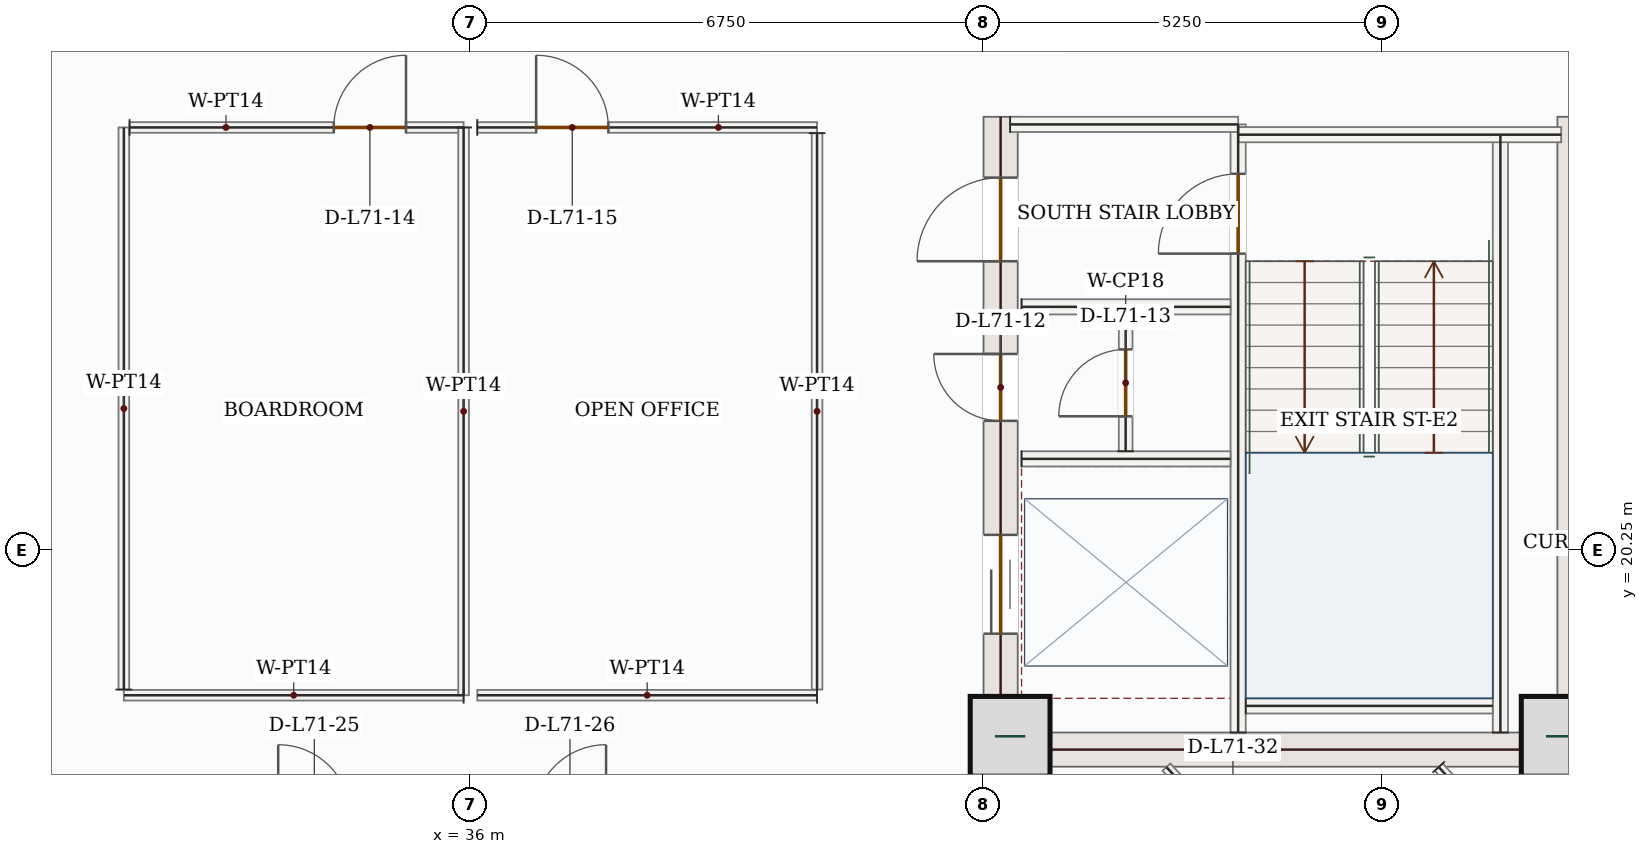
"""IFC4 building model, lengths in metres.
Left out: names, types, materials, properties, quantities, classifications, styles, units other than length and angle.
Written with IfcOpenShell. Run it as: python <this file> out.ifc"""

import sys

from ifc_helpers import new_model, si_unit, direction, frame, frame_2d, origin, origin_2d, place, context, subcontext, project, spatial, rectangle, extrude, source, transform, mapped, element, fill, save


model = new_model("IFC4")
c1 = context("Model", 3, precision=1e-05, world=origin(), true_north=direction((0.0, 1.0)))
c2 = subcontext(c1, "Body", "Model", "MODEL_VIEW")
j1 = project(units=[si_unit("LENGTHUNIT", "METRE"), si_unit("PLANEANGLEUNIT", "RADIAN")], contexts=[c1])
p1 = place(None, origin())
s1 = spatial("IfcSite", under=j1, at=p1, CompositionType="ELEMENT")
p2 = place(p1, origin())
s2 = spatial("IfcBuilding", under=s1, at=p2, CompositionType="ELEMENT")
p3 = place(p2, frame((0.0, 0.0, 295.35)))
s3 = spatial("IfcBuildingStorey", under=s2, at=p3, CompositionType="ELEMENT", Elevation=295.35)
p4 = place(p3, frame((42.975, 17.4, 0.0), z_axis=(0.0, 0.0, 1.0), x_axis=(0.0, 1.0, 0.0)))
e1 = element("IfcWall", 1, at=p4, inside=s3, PredefinedType="SHEAR", context=c2, shape_type="SweptSolid", body=[
    extrude(rectangle(XDim=8.55, YDim=0.45, at=frame_2d((4.275, 0.0))), origin(), (0.0, 0.0, 1.0), 3.5),
])
p5 = place(p4, frame((6.65, 0.0, 0.0)))
e2 = element("IfcOpeningElement", 2, at=p5, cuts=e1, PredefinedType="OPENING", context=c2, shape_type="SweptSolid", body=[
    extrude(rectangle(XDim=1.1, YDim=2.2, at=frame_2d((0.55, 1.1))), frame((0.0, 0.235, 0.0), z_axis=(0.0, -1.0, 0.0), x_axis=(1.0, 0.0, 0.0)), (0.0, 0.0, 1.0), 0.47),
])
p6 = place(p4, frame((1.75, 0.0, 0.0)))
e3 = element("IfcOpeningElement", 3, at=p6, cuts=e1, PredefinedType="OPENING", context=c2, shape_type="SweptSolid", body=[
    extrude(rectangle(XDim=1.3, YDim=2.2, at=frame_2d((0.65, 1.1))), frame((0.0, 0.235, 0.0), z_axis=(0.0, -1.0, 0.0), x_axis=(1.0, 0.0, 0.0)), (0.0, 0.0, 1.0), 0.47),
])
p7 = place(p4, frame((4.55, 0.0, 0.0)))
e4 = element("IfcOpeningElement", 4, at=p7, cuts=e1, PredefinedType="OPENING", context=c2, shape_type="SweptSolid", body=[
    extrude(rectangle(XDim=0.88, YDim=2.1, at=frame_2d((0.44, 1.05))), frame((0.0, 0.235, 0.0), z_axis=(0.0, -1.0, 0.0), x_axis=(1.0, 0.0, 0.0)), (0.0, 0.0, 1.0), 0.47),
])
m1 = source(origin(), c2, "Body", "SweptSolid", [
    extrude(rectangle(XDim=8.55, YDim=0.45, at=frame_2d((4.275, 0.0))), origin(), (0.0, 0.0, 1.0), 3.5),
])
p8 = place(p3, frame((50.525, 17.4, 0.0), z_axis=(0.0, 0.0, 1.0), x_axis=(0.0, 1.0, 0.0)))
e5 = element("IfcWall", 5, at=p8, inside=s3, PredefinedType="SHEAR", context=c2, shape_type="MappedRepresentation", body=[
    mapped(m1, transform((0.0, 0.0, 0.0), x_axis=(1.0, 0.0, 0.0), y_axis=(0.0, 1.0, 0.0), z_axis=(0.0, 0.0, 1.0), scale=1.0)),
])
m2 = source(origin(), c2, "Body", "SweptSolid", [
    extrude(rectangle(XDim=7.1, YDim=0.45, at=frame_2d((3.55, 0.0))), origin(), (0.0, 0.0, 1.0), 3.5),
])
p9 = place(p3, frame((43.2, 17.625, 0.0), z_axis=(0.0, 0.0, 1.0), x_axis=(1.0, 0.0, 0.0)))
e6 = element("IfcWall", 6, at=p9, inside=s3, PredefinedType="SHEAR", context=c2, shape_type="MappedRepresentation", body=[
    mapped(m2, transform((0.0, 0.0, 0.0), x_axis=(1.0, 0.0, 0.0), y_axis=(0.0, 1.0, 0.0), z_axis=(0.0, 0.0, 1.0), scale=1.0)),
])
m3 = source(origin(), c2, "Body", "SweptSolid", [
    extrude(rectangle(XDim=1.05, YDim=1.05, at=origin_2d()), origin(), (0.0, 0.0, 1.0), 3.75),
])
for number, where, z_axis, x_axis in (
    (7, (43.1, 17.8, 0.0), (0.0, 0.0, 1.0), (1.0, 0.0, 0.0)),
    (8, (50.35, 17.8, 0.0), (0.0, 0.0, 1.0), (1.0, 0.0, 0.0)),
):
    element("IfcColumn", number, at=place(p3, frame(where, z_axis=z_axis, x_axis=x_axis)), inside=s3, PredefinedType="COLUMN", context=c2, shape_type="MappedRepresentation", body=[
        mapped(m3, transform((0.0, 0.0, 0.0), x_axis=(1.0, 0.0, 0.0), y_axis=(0.0, 1.0, 0.0), z_axis=(0.0, 0.0, 1.0), scale=1.0)),
    ])
m4 = source(origin(), c2, "Body", "SweptSolid", [
    extrude(rectangle(XDim=11.69, YDim=0.28, at=frame_2d((5.845, 0.0))), origin(), (0.0, 0.0, 1.0), 3.5),
])
p10 = place(p3, frame((53.06, 18.458, 0.0), z_axis=(0.0, 0.0, 1.0), x_axis=(-0.712557502542, -0.701613715353, 0.0)))
e9 = element("IfcWall", 9, at=p10, inside=s3, PredefinedType="SOLIDWALL", context=c2, shape_type="MappedRepresentation", body=[
    mapped(m4, transform((0.0, 0.0, 0.0), x_axis=(1.0, 0.0, 0.0), y_axis=(0.0, 1.0, 0.0), z_axis=(0.0, 0.0, 1.0), scale=1.0)),
])
m5 = source(origin(), c2, "Body", "SweptSolid", [
    extrude(rectangle(XDim=7.87, YDim=0.2, at=frame_2d((3.935, 0.0))), origin(), (0.0, 0.0, 1.0), 3.5),
])
p11 = place(p3, frame((49.55, 17.85, 0.0), z_axis=(0.0, 0.0, 1.0), x_axis=(0.0, 1.0, 0.0)))
e10 = element("IfcWall", 10, at=p11, inside=s3, PredefinedType="SOLIDWALL", context=c2, shape_type="MappedRepresentation", body=[
    mapped(m5, transform((0.0, 0.0, 0.0), x_axis=(1.0, 0.0, 0.0), y_axis=(0.0, 1.0, 0.0), z_axis=(0.0, 0.0, 1.0), scale=1.0)),
])
p12 = place(p3, frame((46.1, 17.85, 0.0), z_axis=(0.0, 0.0, 1.0), x_axis=(0.0, 1.0, 0.0)))
e11 = element("IfcWall", 11, at=p12, inside=s3, PredefinedType="SOLIDWALL", context=c2, shape_type="SweptSolid", body=[
    extrude(rectangle(XDim=8.0, YDim=0.2, at=frame_2d((4.0, 0.0))), origin(), (0.0, 0.0, 1.0), 3.5),
])
p13 = place(p12, frame((6.3, 0.0, 0.0)))
e12 = element("IfcOpeningElement", 12, at=p13, cuts=e11, PredefinedType="OPENING", context=c2, shape_type="SweptSolid", body=[
    extrude(rectangle(XDim=1.05, YDim=2.15, at=frame_2d((0.525, 1.075))), frame((0.0, 0.11, 0.0), z_axis=(0.0, -1.0, 0.0), x_axis=(1.0, 0.0, 0.0)), (0.0, 0.0, 1.0), 0.22),
])
m6 = source(origin(), c2, "Body", "SweptSolid", [
    extrude(rectangle(XDim=3.0, YDim=0.2, at=frame_2d((1.5, 0.0))), origin(), (0.0, 0.0, 1.0), 3.5),
])
p14 = place(p3, frame((43.1, 25.85, 0.0), z_axis=(0.0, 0.0, 1.0), x_axis=(1.0, 0.0, 0.0)))
e13 = element("IfcWall", 13, at=p14, inside=s3, PredefinedType="SOLIDWALL", context=c2, shape_type="MappedRepresentation", body=[
    mapped(m6, transform((0.0, 0.0, 0.0), x_axis=(1.0, 0.0, 0.0), y_axis=(0.0, 1.0, 0.0), z_axis=(0.0, 0.0, 1.0), scale=1.0)),
])
m7 = source(origin(), c2, "Body", "SweptSolid", [
    extrude(rectangle(XDim=4.25, YDim=0.2, at=frame_2d((2.125, 0.0))), origin(), (0.0, 0.0, 1.0), 3.5),
])
p15 = place(p3, frame((46.1, 25.715, 0.0), z_axis=(0.0, 0.0, 1.0), x_axis=(1.0, 0.0, 0.0)))
e14 = element("IfcWall", 14, at=p15, inside=s3, PredefinedType="SOLIDWALL", context=c2, shape_type="MappedRepresentation", body=[
    mapped(m7, transform((0.0, 0.0, 0.0), x_axis=(1.0, 0.0, 0.0), y_axis=(0.0, 1.0, 0.0), z_axis=(0.0, 0.0, 1.0), scale=1.0)),
])
m8 = source(origin(), c2, "Body", "SweptSolid", [
    extrude(rectangle(XDim=3.25, YDim=0.2, at=frame_2d((1.625, 0.0))), origin(), (0.0, 0.0, 1.0), 3.5),
])
p16 = place(p3, frame((46.2, 18.2, 0.0), z_axis=(0.0, 0.0, 1.0), x_axis=(1.0, 0.0, 0.0)))
e15 = element("IfcWall", 15, at=p16, inside=s3, PredefinedType="SOLIDWALL", context=c2, shape_type="MappedRepresentation", body=[
    mapped(m8, transform((0.0, 0.0, 0.0), x_axis=(1.0, 0.0, 0.0), y_axis=(0.0, 1.0, 0.0), z_axis=(0.0, 0.0, 1.0), scale=1.0)),
])
m9 = source(origin(), c2, "Body", "SweptSolid", [
    extrude(rectangle(XDim=2.75, YDim=0.2, at=frame_2d((1.375, 0.0))), origin(), (0.0, 0.0, 1.0), 3.5),
])
for number, where, z_axis, x_axis in (
    (16, (43.25, 23.45, 0.0), (0.0, 0.0, 1.0), (1.0, 0.0, 0.0)),
    (17, (43.25, 21.45, 0.0), (0.0, 0.0, 1.0), (1.0, 0.0, 0.0)),
):
    element("IfcWall", number, at=place(p3, frame(where, z_axis=z_axis, x_axis=x_axis)), inside=s3, PredefinedType="SOLIDWALL", context=c2, shape_type="MappedRepresentation", body=[
        mapped(m9, transform((0.0, 0.0, 0.0), x_axis=(1.0, 0.0, 0.0), y_axis=(0.0, 1.0, 0.0), z_axis=(0.0, 0.0, 1.0), scale=1.0)),
    ])
p17 = place(p3, frame((44.62, 21.55, 0.0), z_axis=(0.0, 0.0, 1.0), x_axis=(0.0, 1.0, 0.0)))
e18 = element("IfcWall", 18, at=p17, inside=s3, PredefinedType="PARTITIONING", context=c2, shape_type="SweptSolid", body=[
    extrude(rectangle(XDim=1.8, YDim=0.18, at=frame_2d((0.9, 0.0))), origin(), (0.0, 0.0, 1.0), 3.5),
])
p18 = place(p17, frame((0.46, 0.0, 0.0)))
e19 = element("IfcOpeningElement", 19, at=p18, cuts=e18, PredefinedType="OPENING", context=c2, shape_type="SweptSolid", body=[
    extrude(rectangle(XDim=0.88, YDim=2.1, at=frame_2d((0.44, 1.05))), frame((0.0, 0.1, 0.0), z_axis=(0.0, -1.0, 0.0), x_axis=(1.0, 0.0, 0.0)), (0.0, 0.0, 1.0), 0.2),
])
p19 = place(p3, frame((48.311, 13.985, 0.0), z_axis=(0.0, 0.0, 1.0), x_axis=(-0.679002327249, 0.73413611789, 0.0)))
e20 = element("IfcWall", 20, at=p19, inside=s3, PredefinedType="PARTITIONING", context=c2, shape_type="SweptSolid", body=[
    extrude(rectangle(XDim=4.645, YDim=0.14, at=frame_2d((2.323, 0.0))), origin(), (0.0, 0.0, 1.0), 3.5),
])
p20 = place(p19, frame((2.882, 0.0, 0.0)))
e21 = element("IfcOpeningElement", 21, at=p20, cuts=e20, PredefinedType="OPENING", context=c2, shape_type="SweptSolid", body=[
    extrude(rectangle(XDim=0.95, YDim=2.15, at=frame_2d((0.475, 1.075))), frame((0.0, 0.08, 0.0), z_axis=(0.0, -1.0, 0.0), x_axis=(1.0, 0.0, 0.0)), (0.0, 0.0, 1.0), 0.16),
])
m10 = source(origin(), c2, "Body", "SweptSolid", [
    extrude(rectangle(XDim=2.13, YDim=0.14, at=frame_2d((1.065, 0.0))), origin(), (0.0, 0.0, 1.0), 3.5),
])
p21 = place(p3, frame((48.739, 17.395, 0.0), z_axis=(0.0, 0.0, 1.0), x_axis=(0.678946242809, -0.734187986401, 0.0)))
e22 = element("IfcWall", 22, at=p21, inside=s3, PredefinedType="PARTITIONING", context=c2, shape_type="MappedRepresentation", body=[
    mapped(m10, transform((0.0, 0.0, 0.0), x_axis=(1.0, 0.0, 0.0), y_axis=(0.0, 1.0, 0.0), z_axis=(0.0, 0.0, 1.0), scale=1.0)),
])
m11 = source(origin(), c2, "Body", "SweptSolid", [
    extrude(rectangle(XDim=4.47, YDim=0.14, at=frame_2d((2.235, 0.0))), origin(), (0.0, 0.0, 1.0), 3.5),
])
p22 = place(p3, frame((35.91, 18.34, 0.0), z_axis=(0.0, 0.0, 1.0), x_axis=(-1.0, 0.0, 0.0)))
e23 = element("IfcWall", 23, at=p22, inside=s3, PredefinedType="PARTITIONING", context=c2, shape_type="MappedRepresentation", body=[
    mapped(m11, transform((0.0, 0.0, 0.0), x_axis=(1.0, 0.0, 0.0), y_axis=(0.0, 1.0, 0.0), z_axis=(0.0, 0.0, 1.0), scale=1.0)),
])
m12 = source(origin(), c2, "Body", "SweptSolid", [
    extrude(rectangle(XDim=7.395, YDim=0.14, at=frame_2d((3.698, 0.0))), origin(), (0.0, 0.0, 1.0), 3.5),
])
p23 = place(p3, frame((31.44, 18.415, 0.0), z_axis=(0.0, 0.0, 1.0), x_axis=(0.0, 1.0, 0.0)))
e24 = element("IfcWall", 24, at=p23, inside=s3, PredefinedType="PARTITIONING", context=c2, shape_type="MappedRepresentation", body=[
    mapped(m12, transform((0.0, 0.0, 0.0), x_axis=(1.0, 0.0, 0.0), y_axis=(0.0, 1.0, 0.0), z_axis=(0.0, 0.0, 1.0), scale=1.0)),
])
p24 = place(p3, frame((31.515, 25.81, 0.0), z_axis=(0.0, 0.0, 1.0), x_axis=(1.0, 0.0, 0.0)))
e25 = element("IfcWall", 25, at=p24, inside=s3, PredefinedType="PARTITIONING", context=c2, shape_type="SweptSolid", body=[
    extrude(rectangle(XDim=4.395, YDim=0.14, at=frame_2d((2.198, 0.0))), origin(), (0.0, 0.0, 1.0), 3.5),
])
p25 = place(p24, frame((2.687, 0.0, 0.0)))
e26 = element("IfcOpeningElement", 26, at=p25, cuts=e25, PredefinedType="OPENING", context=c2, shape_type="SweptSolid", body=[
    extrude(rectangle(XDim=0.95, YDim=2.15, at=frame_2d((0.475, 1.075))), frame((0.0, 0.08, 0.0), z_axis=(0.0, -1.0, 0.0), x_axis=(1.0, 0.0, 0.0)), (0.0, 0.0, 1.0), 0.16),
])
m13 = source(origin(), c2, "Body", "SweptSolid", [
    extrude(rectangle(XDim=7.47, YDim=0.14, at=frame_2d((3.735, 0.0))), origin(), (0.0, 0.0, 1.0), 3.5),
])
p26 = place(p3, frame((35.91, 25.81, 0.0), z_axis=(0.0, 0.0, 1.0), x_axis=(0.0, -1.0, 0.0)))
e27 = element("IfcWall", 27, at=p26, inside=s3, PredefinedType="PARTITIONING", context=c2, shape_type="MappedRepresentation", body=[
    mapped(m13, transform((0.0, 0.0, 0.0), x_axis=(1.0, 0.0, 0.0), y_axis=(0.0, 1.0, 0.0), z_axis=(0.0, 0.0, 1.0), scale=1.0)),
])
p27 = place(p3, frame((40.56, 18.34, 0.0), z_axis=(0.0, 0.0, 1.0), x_axis=(-1.0, 0.0, 0.0)))
e28 = element("IfcWall", 28, at=p27, inside=s3, PredefinedType="PARTITIONING", context=c2, shape_type="MappedRepresentation", body=[
    mapped(m11, transform((0.0, 0.0, 0.0), x_axis=(1.0, 0.0, 0.0), y_axis=(0.0, 1.0, 0.0), z_axis=(0.0, 0.0, 1.0), scale=1.0)),
])
p28 = place(p3, frame((36.09, 25.81, 0.0), z_axis=(0.0, 0.0, 1.0), x_axis=(1.0, 0.0, 0.0)))
e29 = element("IfcWall", 29, at=p28, inside=s3, PredefinedType="PARTITIONING", context=c2, shape_type="SweptSolid", body=[
    extrude(rectangle(XDim=4.47, YDim=0.14, at=frame_2d((2.235, 0.0))), origin(), (0.0, 0.0, 1.0), 3.5),
])
p29 = place(p28, frame((0.774, 0.0, 0.0)))
e30 = element("IfcOpeningElement", 30, at=p29, cuts=e29, PredefinedType="OPENING", context=c2, shape_type="SweptSolid", body=[
    extrude(rectangle(XDim=0.95, YDim=2.15, at=frame_2d((0.475, 1.075))), frame((0.0, 0.08, 0.0), z_axis=(0.0, -1.0, 0.0), x_axis=(1.0, 0.0, 0.0)), (0.0, 0.0, 1.0), 0.16),
])
m14 = source(origin(), c2, "Body", "SweptSolid", [
    extrude(rectangle(XDim=7.32, YDim=0.14, at=frame_2d((3.66, 0.0))), origin(), (0.0, 0.0, 1.0), 3.5),
])
p30 = place(p3, frame((40.56, 25.735, 0.0), z_axis=(0.0, 0.0, 1.0), x_axis=(0.0, -1.0, 0.0)))
e31 = element("IfcWall", 31, at=p30, inside=s3, PredefinedType="PARTITIONING", context=c2, shape_type="MappedRepresentation", body=[
    mapped(m14, transform((0.0, 0.0, 0.0), x_axis=(1.0, 0.0, 0.0), y_axis=(0.0, 1.0, 0.0), z_axis=(0.0, 0.0, 1.0), scale=1.0)),
])
m15 = source(origin(), c2, "Body", "SweptSolid", [
    extrude(rectangle(XDim=1.05, YDim=2.15, at=frame_2d((0.525, 1.075))), frame((0.0, 0.025, 0.0), z_axis=(0.0, -1.0, 0.0), x_axis=(1.0, 0.0, 0.0)), (0.0, 0.0, 1.0), 0.05),
])
p31 = place(p13, origin())
e32 = element("IfcDoor", 32, at=p31, inside=s3, OperationType="SINGLE_SWING_LEFT", PredefinedType="DOOR", context=c2, shape_type="MappedRepresentation", body=[
    mapped(m15, transform((0.0, 0.0, 0.0), x_axis=(1.0, 0.0, 0.0), y_axis=(0.0, 1.0, 0.0), z_axis=(0.0, 0.0, 1.0), scale=1.0)),
])
fill(e12, e32)
m16 = source(origin(), c2, "Body", "SweptSolid", [
    extrude(rectangle(XDim=1.1, YDim=2.2, at=frame_2d((0.55, 1.1))), frame((0.0, 0.025, 0.0), z_axis=(0.0, -1.0, 0.0), x_axis=(1.0, 0.0, 0.0)), (0.0, 0.0, 1.0), 0.05),
])
p32 = place(p5, origin())
e33 = element("IfcDoor", 33, at=p32, inside=s3, OperationType="SINGLE_SWING_LEFT", PredefinedType="DOOR", context=c2, shape_type="MappedRepresentation", body=[
    mapped(m16, transform((0.0, 0.0, 0.0), x_axis=(1.0, 0.0, 0.0), y_axis=(0.0, 1.0, 0.0), z_axis=(0.0, 0.0, 1.0), scale=1.0)),
])
fill(e2, e33)
m17 = source(origin(), c2, "Body", "SweptSolid", [
    extrude(rectangle(XDim=1.3, YDim=2.2, at=frame_2d((0.65, 1.1))), frame((0.0, 0.025, 0.0), z_axis=(0.0, -1.0, 0.0), x_axis=(1.0, 0.0, 0.0)), (0.0, 0.0, 1.0), 0.05),
])
p33 = place(p6, origin())
e34 = element("IfcDoor", 34, at=p33, inside=s3, OperationType="DOUBLE_DOOR_SLIDING", PredefinedType="DOOR", context=c2, shape_type="MappedRepresentation", body=[
    mapped(m17, transform((0.0, 0.0, 0.0), x_axis=(1.0, 0.0, 0.0), y_axis=(0.0, 1.0, 0.0), z_axis=(0.0, 0.0, 1.0), scale=1.0)),
])
fill(e3, e34)
m18 = source(origin(), c2, "Body", "SweptSolid", [
    extrude(rectangle(XDim=0.88, YDim=2.1, at=frame_2d((0.44, 1.05))), frame((0.0, 0.025, 0.0), z_axis=(0.0, -1.0, 0.0), x_axis=(1.0, 0.0, 0.0)), (0.0, 0.0, 1.0), 0.05),
])
p34 = place(p7, origin())
e35 = element("IfcDoor", 35, at=p34, inside=s3, OperationType="SINGLE_SWING_RIGHT", PredefinedType="DOOR", context=c2, shape_type="MappedRepresentation", body=[
    mapped(m18, transform((0.0, 0.0, 0.0), x_axis=(1.0, 0.0, 0.0), y_axis=(0.0, 1.0, 0.0), z_axis=(0.0, 0.0, 1.0), scale=1.0)),
])
fill(e4, e35)
p35 = place(p18, origin())
e36 = element("IfcDoor", 36, at=p35, inside=s3, OperationType="SINGLE_SWING_LEFT", PredefinedType="DOOR", context=c2, shape_type="MappedRepresentation", body=[
    mapped(m18, transform((0.0, 0.0, 0.0), x_axis=(1.0, 0.0, 0.0), y_axis=(0.0, 1.0, 0.0), z_axis=(0.0, 0.0, 1.0), scale=1.0)),
])
fill(e19, e36)
m19 = source(origin(), c2, "Body", "SweptSolid", [
    extrude(rectangle(XDim=0.95, YDim=2.15, at=frame_2d((0.475, 1.075))), frame((0.0, 0.025, 0.0), z_axis=(0.0, -1.0, 0.0), x_axis=(1.0, 0.0, 0.0)), (0.0, 0.0, 1.0), 0.05),
])
p36 = place(p25, origin())
e37 = element("IfcDoor", 37, at=p36, inside=s3, OperationType="SINGLE_SWING_RIGHT", PredefinedType="DOOR", context=c2, shape_type="MappedRepresentation", body=[
    mapped(m19, transform((0.0, 0.0, 0.0), x_axis=(1.0, 0.0, 0.0), y_axis=(0.0, 1.0, 0.0), z_axis=(0.0, 0.0, 1.0), scale=1.0)),
])
fill(e26, e37)
p37 = place(p29, origin())
e38 = element("IfcDoor", 38, at=p37, inside=s3, OperationType="SINGLE_SWING_LEFT", PredefinedType="DOOR", context=c2, shape_type="MappedRepresentation", body=[
    mapped(m19, transform((0.0, 0.0, 0.0), x_axis=(1.0, 0.0, 0.0), y_axis=(0.0, 1.0, 0.0), z_axis=(0.0, 0.0, 1.0), scale=1.0)),
])
fill(e30, e38)
save(model, sys.argv[1])
